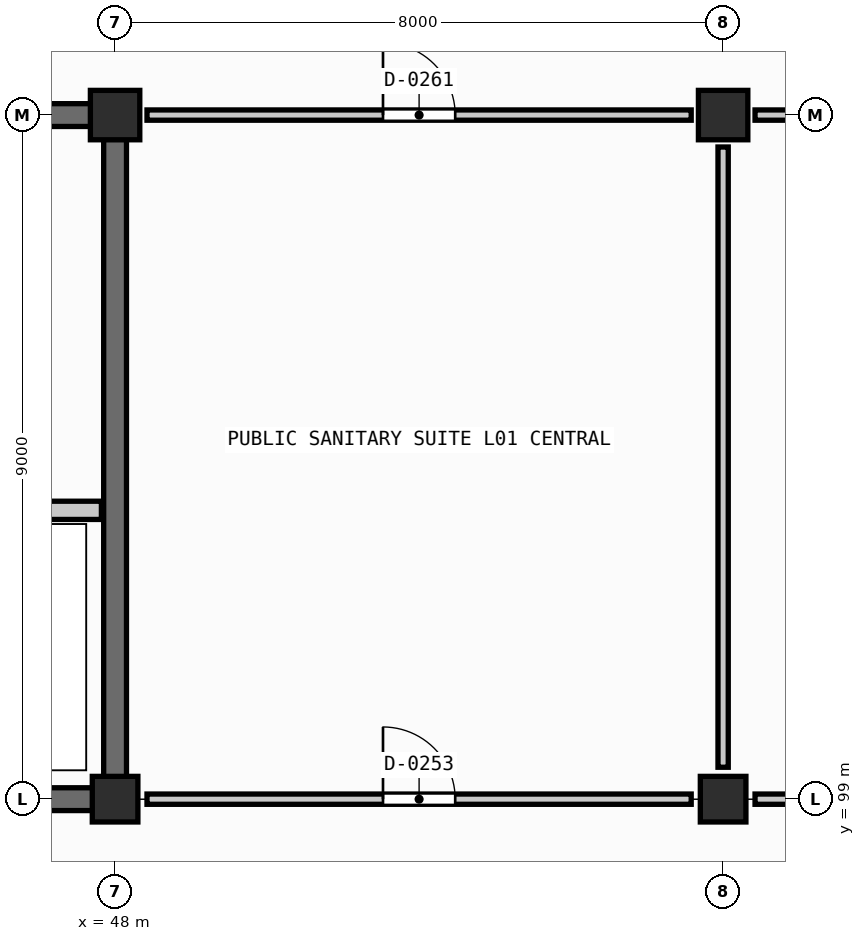
"""IFC4 building model, lengths in metres.
Left out: names, types, materials, properties, quantities, classifications, styles, units other than length and angle.
Written with IfcOpenShell. Run it as: python <this file> out.ifc"""

import sys

from ifc_helpers import new_model, si_unit, direction, frame, frame_2d, origin, origin_2d, place, context, subcontext, project, spatial, rectangle, extrude, element, fill, save


model = new_model("IFC4")
c1 = context("Model", 3, precision=1e-05, world=origin(), true_north=direction((0.0, 1.0)))
c2 = subcontext(c1, "Body", "Model", "MODEL_VIEW")
j1 = project(units=[si_unit("LENGTHUNIT", "METRE"), si_unit("PLANEANGLEUNIT", "RADIAN")], contexts=[c1])
p1 = place(None, origin())
s1 = spatial("IfcSite", under=j1, at=p1, CompositionType="ELEMENT")
p2 = place(p1, origin())
s2 = spatial("IfcBuilding", under=s1, at=p2, CompositionType="ELEMENT")
p3 = place(p2, frame((0.0, 0.0, 4.8)))
s3 = spatial("IfcBuildingStorey", under=s2, at=p3, CompositionType="ELEMENT", Elevation=4.8)
p4 = place(p3, frame((48.0, 99.0, 0.0), z_axis=(0.0, 0.0, 1.0), x_axis=(1.0, 0.0, 0.0)))
e1 = element("IfcColumn", 1, at=p4, inside=s3, PredefinedType="COLUMN", context=c2, shape_type="SweptSolid", body=[
    extrude(rectangle(XDim=0.6, YDim=0.6, at=origin_2d()), origin(), (0.0, 0.0, 1.0), 4.2),
])
p5 = place(p3, frame((48.0, 108.0, 0.0), z_axis=(0.0, 0.0, 1.0), x_axis=(1.0, 0.0, 0.0)))
e2 = element("IfcColumn", 2, at=p5, inside=s3, PredefinedType="COLUMN", context=c2, shape_type="SweptSolid", body=[
    extrude(rectangle(XDim=0.65, YDim=0.65, at=origin_2d()), origin(), (0.0, 0.0, 1.0), 4.2),
])
p6 = place(p3, frame((56.0, 99.0, 0.0), z_axis=(0.0, 0.0, 1.0), x_axis=(1.0, 0.0, 0.0)))
e3 = element("IfcColumn", 3, at=p6, inside=s3, PredefinedType="COLUMN", context=c2, shape_type="SweptSolid", body=[
    extrude(rectangle(XDim=0.6, YDim=0.6, at=origin_2d()), origin(), (0.0, 0.0, 1.0), 4.2),
])
p7 = place(p3, frame((56.0, 108.0, 0.0), z_axis=(0.0, 0.0, 1.0), x_axis=(1.0, 0.0, 0.0)))
e4 = element("IfcColumn", 4, at=p7, inside=s3, PredefinedType="COLUMN", context=c2, shape_type="SweptSolid", body=[
    extrude(rectangle(XDim=0.65, YDim=0.65, at=origin_2d()), origin(), (0.0, 0.0, 1.0), 4.2),
])
p8 = place(p3, frame((40.295, 99.0, 0.0), z_axis=(0.0, 0.0, 1.0), x_axis=(1.0, 0.0, 0.0)))
e5 = element("IfcWall", 5, at=p8, inside=s3, PredefinedType="SHEAR", context=c2, shape_type="SweptSolid", body=[
    extrude(rectangle(XDim=7.41, YDim=0.3, at=frame_2d((3.705, 0.0))), origin(), (0.0, 0.0, 1.0), 3.955),
])
p9 = place(p3, frame((40.32, 108.0, 0.0), z_axis=(0.0, 0.0, 1.0), x_axis=(1.0, 0.0, 0.0)))
e6 = element("IfcWall", 6, at=p9, inside=s3, PredefinedType="SHEAR", context=c2, shape_type="SweptSolid", body=[
    extrude(rectangle(XDim=7.36, YDim=0.3, at=frame_2d((3.68, 0.0))), origin(), (0.0, 0.0, 1.0), 3.955),
])
p10 = place(p9, frame((4.7, 0.0, 0.0)))
e7 = element("IfcOpeningElement", 7, at=p10, cuts=e6, PredefinedType="OPENING", context=c2, shape_type="SweptSolid", body=[
    extrude(rectangle(XDim=1.7, YDim=2.25, at=frame_2d((0.85, 1.125))), frame((0.0, 0.16, 0.0), z_axis=(0.0, -1.0, 0.0), x_axis=(1.0, 0.0, 0.0)), (0.0, 0.0, 1.0), 0.32),
])
p11 = place(p3, frame((48.0, 99.295, 0.0), z_axis=(0.0, 0.0, 1.0), x_axis=(0.0, 1.0, 0.0)))
e8 = element("IfcWall", 8, at=p11, inside=s3, PredefinedType="SHEAR", context=c2, shape_type="SweptSolid", body=[
    extrude(rectangle(XDim=8.385, YDim=0.3, at=frame_2d((4.192, 0.0))), origin(), (0.0, 0.0, 1.0), 3.955),
])
p12 = place(p3, frame((44.75, 102.8, 0.0), z_axis=(0.0, 0.0, 1.0), x_axis=(1.0, 0.0, 0.0)))
e9 = element("IfcWall", 9, at=p12, inside=s3, PredefinedType="SHEAR", context=c2, shape_type="SweptSolid", body=[
    extrude(rectangle(XDim=3.07, YDim=0.24, at=frame_2d((1.535, 0.0))), origin(), (0.0, 0.0, 1.0), 3.305),
])
p13 = place(p12, frame((1.035, 0.0, 0.0)))
e10 = element("IfcOpeningElement", 10, at=p13, cuts=e9, PredefinedType="OPENING", context=c2, shape_type="SweptSolid", body=[
    extrude(rectangle(XDim=1.0, YDim=2.15, at=frame_2d((0.5, 1.075))), frame((0.0, 0.13, 0.0), z_axis=(0.0, -1.0, 0.0), x_axis=(1.0, 0.0, 0.0)), (0.0, 0.0, 1.0), 0.26),
])
p14 = place(p3, frame((48.42, 99.0, 0.0), z_axis=(0.0, 0.0, 1.0), x_axis=(1.0, 0.0, 0.0)))
e11 = element("IfcWall", 11, at=p14, inside=s3, PredefinedType="PLUMBINGWALL", context=c2, shape_type="SweptSolid", body=[
    extrude(rectangle(XDim=7.16, YDim=0.135, at=frame_2d((3.58, 0.0))), origin(), (0.0, 0.0, 1.0), 3.05),
])
p15 = place(p14, frame((3.105, 0.0, 0.0)))
e12 = element("IfcOpeningElement", 12, at=p15, cuts=e11, PredefinedType="OPENING", context=c2, shape_type="SweptSolid", body=[
    extrude(rectangle(XDim=0.95, YDim=2.1, at=frame_2d((0.475, 1.05))), frame((0.0, 0.078, 0.0), z_axis=(0.0, -1.0, 0.0), x_axis=(1.0, 0.0, 0.0)), (0.0, 0.0, 1.0), 0.155),
])
p16 = place(p3, frame((56.42, 99.0, 0.0), z_axis=(0.0, 0.0, 1.0), x_axis=(1.0, 0.0, 0.0)))
e13 = element("IfcWall", 13, at=p16, inside=s3, PredefinedType="PLUMBINGWALL", context=c2, shape_type="SweptSolid", body=[
    extrude(rectangle(XDim=6.76, YDim=0.135, at=frame_2d((3.38, 0.0))), origin(), (0.0, 0.0, 1.0), 3.05),
])
p17 = place(p16, frame((2.84, 0.0, 0.0)))
e14 = element("IfcOpeningElement", 14, at=p17, cuts=e13, PredefinedType="OPENING", context=c2, shape_type="SweptSolid", body=[
    extrude(rectangle(XDim=1.08, YDim=2.12, at=frame_2d((0.54, 1.06))), frame((0.0, 0.078, 0.0), z_axis=(0.0, -1.0, 0.0), x_axis=(1.0, 0.0, 0.0)), (0.0, 0.0, 1.0), 0.155),
])
p18 = place(p3, frame((56.0, 99.42, 0.0), z_axis=(0.0, 0.0, 1.0), x_axis=(0.0, 1.0, 0.0)))
e15 = element("IfcWall", 15, at=p18, inside=s3, PredefinedType="PLUMBINGWALL", context=c2, shape_type="SweptSolid", body=[
    extrude(rectangle(XDim=8.16, YDim=0.135, at=frame_2d((4.08, 0.0))), origin(), (0.0, 0.0, 1.0), 3.05),
])
p19 = place(p3, frame((48.42, 108.0, 0.0), z_axis=(0.0, 0.0, 1.0), x_axis=(1.0, 0.0, 0.0)))
e16 = element("IfcWall", 16, at=p19, inside=s3, PredefinedType="PLUMBINGWALL", context=c2, shape_type="SweptSolid", body=[
    extrude(rectangle(XDim=7.16, YDim=0.135, at=frame_2d((3.58, 0.0))), origin(), (0.0, 0.0, 1.0), 3.05),
])
p20 = place(p19, frame((3.105, 0.0, 0.0)))
e17 = element("IfcOpeningElement", 17, at=p20, cuts=e16, PredefinedType="OPENING", context=c2, shape_type="SweptSolid", body=[
    extrude(rectangle(XDim=0.95, YDim=2.1, at=frame_2d((0.475, 1.05))), frame((0.0, 0.078, 0.0), z_axis=(0.0, -1.0, 0.0), x_axis=(1.0, 0.0, 0.0)), (0.0, 0.0, 1.0), 0.155),
])
p21 = place(p3, frame((56.42, 108.0, 0.0), z_axis=(0.0, 0.0, 1.0), x_axis=(1.0, 0.0, 0.0)))
e18 = element("IfcWall", 18, at=p21, inside=s3, PredefinedType="PLUMBINGWALL", context=c2, shape_type="SweptSolid", body=[
    extrude(rectangle(XDim=6.76, YDim=0.135, at=frame_2d((3.38, 0.0))), origin(), (0.0, 0.0, 1.0), 3.05),
])
p22 = place(p21, frame((2.855, 0.0, 0.0)))
e19 = element("IfcOpeningElement", 19, at=p22, cuts=e18, PredefinedType="OPENING", context=c2, shape_type="SweptSolid", body=[
    extrude(rectangle(XDim=1.05, YDim=2.1, at=frame_2d((0.525, 1.05))), frame((0.0, 0.078, 0.0), z_axis=(0.0, -1.0, 0.0), x_axis=(1.0, 0.0, 0.0)), (0.0, 0.0, 1.0), 0.155),
])
p23 = place(p15, origin())
e20 = element("IfcDoor", 20, at=p23, inside=s3, OperationType="SINGLE_SWING_LEFT", PredefinedType="DOOR", context=c2, shape_type="SweptSolid", body=[
    extrude(rectangle(XDim=0.95, YDim=2.1, at=frame_2d((0.475, 1.05))), frame((0.0, 0.025, 0.0), z_axis=(0.0, -1.0, 0.0), x_axis=(1.0, 0.0, 0.0)), (0.0, 0.0, 1.0), 0.05),
])
fill(e12, e20)
p24 = place(p20, origin())
e21 = element("IfcDoor", 21, at=p24, inside=s3, OperationType="SINGLE_SWING_LEFT", PredefinedType="DOOR", context=c2, shape_type="SweptSolid", body=[
    extrude(rectangle(XDim=0.95, YDim=2.1, at=frame_2d((0.475, 1.05))), frame((0.0, 0.025, 0.0), z_axis=(0.0, -1.0, 0.0), x_axis=(1.0, 0.0, 0.0)), (0.0, 0.0, 1.0), 0.05),
])
fill(e17, e21)
save(model, sys.argv[1])
